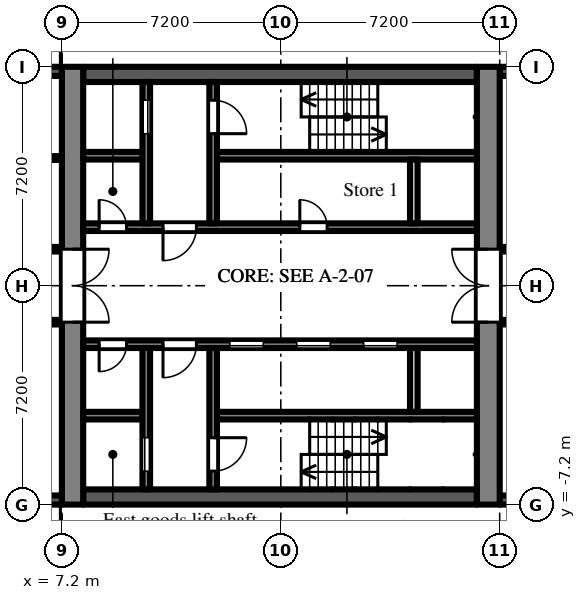
"""IFC4 building model, lengths in metres.
Left out: names, types, materials, properties, quantities, classifications, styles, units other than length and angle.
Written with IfcOpenShell. Run it as: python <this file> out.ifc"""

import sys

from ifc_helpers import new_model, si_unit, direction, frame, frame_2d, origin, place, context, subcontext, project, spatial, rectangle, extrude, element, fill, save


model = new_model("IFC4")
c1 = context("Model", 3, precision=1e-05, world=origin(), true_north=direction((0.0, 1.0)))
c2 = subcontext(c1, "Body", "Model", "MODEL_VIEW")
j1 = project(units=[si_unit("LENGTHUNIT", "METRE"), si_unit("PLANEANGLEUNIT", "RADIAN")], contexts=[c1])
p1 = place(None, origin())
s1 = spatial("IfcSite", under=j1, at=p1, CompositionType="ELEMENT")
p2 = place(p1, origin())
s2 = spatial("IfcBuilding", under=s1, at=p2, CompositionType="ELEMENT")
p3 = place(p2, frame((0.0, 0.0, 35.7)))
s3 = spatial("IfcBuildingStorey", under=s2, at=p3, CompositionType="ELEMENT", Elevation=35.7)
p4 = place(p3, frame((21.6, -7.05, 0.0), z_axis=(0.0, 0.0, 1.0), x_axis=(1.0, 0.0, 0.0)))
e1 = element("IfcWall", 1, at=p4, inside=s3, PredefinedType="SOLIDWALL", context=c2, shape_type="SweptSolid", body=[
    extrude(rectangle(XDim=2.7, YDim=0.3, at=frame_2d((1.35, 0.0))), origin(), (0.0, 0.0, 1.0), 2.1),
])
p5 = place(p4, frame((0.75, 0.0, 0.2)))
e2 = element("IfcOpeningElement", 2, at=p5, cuts=e1, PredefinedType="OPENING", context=c2, shape_type="SweptSolid", body=[
    extrude(rectangle(XDim=1.2, YDim=1.85, at=frame_2d((0.6, 0.925))), frame((0.0, 0.16, 0.0), z_axis=(0.0, -1.0, 0.0), x_axis=(1.0, 0.0, 0.0)), (0.0, 0.0, 1.0), 0.32),
])
p6 = place(p3, frame((24.3, 7.05, 0.0), z_axis=(0.0, 0.0, 1.0), x_axis=(-1.0, 0.0, 0.0)))
e3 = element("IfcWall", 3, at=p6, inside=s3, PredefinedType="SOLIDWALL", context=c2, shape_type="SweptSolid", body=[
    extrude(rectangle(XDim=2.7, YDim=0.3, at=frame_2d((1.35, 0.0))), origin(), (0.0, 0.0, 1.0), 2.1),
])
p7 = place(p6, frame((0.75, 0.0, 0.2)))
e4 = element("IfcOpeningElement", 4, at=p7, cuts=e3, PredefinedType="OPENING", context=c2, shape_type="SweptSolid", body=[
    extrude(rectangle(XDim=1.2, YDim=1.85, at=frame_2d((0.6, 0.925))), frame((0.0, 0.16, 0.0), z_axis=(0.0, -1.0, 0.0), x_axis=(1.0, 0.0, 0.0)), (0.0, 0.0, 1.0), 0.32),
])
for number, where, z_axis, x_axis in (
    (5, (7.2, 7.05, 0.0), (0.0, 0.0, 1.0), (-1.0, 0.0, 0.0)),
    (6, (4.2, -7.05, 0.0), (0.0, 0.0, 1.0), (1.0, 0.0, 0.0)),
):
    element("IfcWall", number, at=place(p3, frame(where, z_axis=z_axis, x_axis=x_axis)), inside=s3, PredefinedType="SOLIDWALL", context=c2, shape_type="SweptSolid", body=[
        extrude(rectangle(XDim=3.0, YDim=0.3, at=frame_2d((1.5, 0.0))), origin(), (0.0, 0.0, 1.0), 2.1),
    ])
p8 = place(p3, frame((7.55, -7.2, 0.0), z_axis=(0.0, 0.0, 1.0), x_axis=(0.0, 1.0, 0.0)))
e7 = element("IfcWall", 7, at=p8, inside=s3, PredefinedType="SHEAR", context=c2, shape_type="SweptSolid", body=[
    extrude(rectangle(XDim=14.4, YDim=0.7, at=frame_2d((7.2, 0.0))), origin(), (0.0, 0.0, 1.0), 2.575),
])
p9 = place(p8, frame((6.0, 0.0, 0.0)))
e8 = element("IfcOpeningElement", 8, at=p9, cuts=e7, PredefinedType="OPENING", context=c2, shape_type="SweptSolid", body=[
    extrude(rectangle(XDim=2.4, YDim=2.2, at=frame_2d((1.2, 1.1))), frame((0.0, 0.36, 0.0), z_axis=(0.0, -1.0, 0.0), x_axis=(1.0, 0.0, 0.0)), (0.0, 0.0, 1.0), 0.72),
])
p10 = place(p3, frame((21.225, -7.2, 0.0), z_axis=(0.0, 0.0, 1.0), x_axis=(0.0, 1.0, 0.0)))
e9 = element("IfcWall", 9, at=p10, inside=s3, PredefinedType="SHEAR", context=c2, shape_type="SweptSolid", body=[
    extrude(rectangle(XDim=14.4, YDim=0.75, at=frame_2d((7.2, 0.0))), origin(), (0.0, 0.0, 1.0), 2.575),
])
p11 = place(p10, frame((6.0, 0.0, 0.0)))
e10 = element("IfcOpeningElement", 10, at=p11, cuts=e9, PredefinedType="OPENING", context=c2, shape_type="SweptSolid", body=[
    extrude(rectangle(XDim=2.4, YDim=2.2, at=frame_2d((1.2, 1.1))), frame((0.0, 0.385, 0.0), z_axis=(0.0, -1.0, 0.0), x_axis=(1.0, 0.0, 0.0)), (0.0, 0.0, 1.0), 0.77),
])
p12 = place(p3, frame((7.9, 6.95, 0.0), z_axis=(0.0, 0.0, 1.0), x_axis=(1.0, 0.0, 0.0)))
e11 = element("IfcWall", 11, at=p12, inside=s3, PredefinedType="SHEAR", context=c2, shape_type="SweptSolid", body=[
    extrude(rectangle(XDim=12.95, YDim=0.5, at=frame_2d((6.475, 0.0))), origin(), (0.0, 0.0, 1.0), 2.575),
])
p13 = place(p3, frame((7.9, 1.925, 0.0), z_axis=(0.0, 0.0, 1.0), x_axis=(1.0, 0.0, 0.0)))
e12 = element("IfcWall", 12, at=p13, inside=s3, PredefinedType="SHEAR", context=c2, shape_type="SweptSolid", body=[
    extrude(rectangle(XDim=12.95, YDim=0.25, at=frame_2d((6.475, 0.0))), origin(), (0.0, 0.0, 1.0), 2.575),
])
p14 = place(p13, frame((0.525, 0.0, 0.0)))
e13 = element("IfcOpeningElement", 13, at=p14, cuts=e12, PredefinedType="OPENING", context=c2, shape_type="SweptSolid", body=[
    extrude(rectangle(XDim=0.9, YDim=2.1, at=frame_2d((0.45, 1.05))), frame((0.0, 0.135, 0.0), z_axis=(0.0, -1.0, 0.0), x_axis=(1.0, 0.0, 0.0)), (0.0, 0.0, 1.0), 0.27),
])
p15 = place(p13, frame((2.625, 0.0, 0.0)))
e14 = element("IfcOpeningElement", 14, at=p15, cuts=e12, PredefinedType="OPENING", context=c2, shape_type="SweptSolid", body=[
    extrude(rectangle(XDim=1.1, YDim=2.1, at=frame_2d((0.55, 1.05))), frame((0.0, 0.135, 0.0), z_axis=(0.0, -1.0, 0.0), x_axis=(1.0, 0.0, 0.0)), (0.0, 0.0, 1.0), 0.27),
])
p16 = place(p13, frame((7.125, 0.0, 0.0)))
e15 = element("IfcOpeningElement", 15, at=p16, cuts=e12, PredefinedType="OPENING", context=c2, shape_type="SweptSolid", body=[
    extrude(rectangle(XDim=0.9, YDim=2.1, at=frame_2d((0.45, 1.05))), frame((0.0, 0.135, 0.0), z_axis=(0.0, -1.0, 0.0), x_axis=(1.0, 0.0, 0.0)), (0.0, 0.0, 1.0), 0.27),
])
p17 = place(p3, frame((7.9, 4.275, 0.0), z_axis=(0.0, 0.0, 1.0), x_axis=(1.0, 0.0, 0.0)))
e16 = element("IfcWall", 16, at=p17, inside=s3, PredefinedType="SHEAR", context=c2, shape_type="SweptSolid", body=[
    extrude(rectangle(XDim=1.95, YDim=0.25, at=frame_2d((0.975, 0.0))), origin(), (0.0, 0.0, 1.0), 2.575),
])
p18 = place(p3, frame((12.3, 4.275, 0.0), z_axis=(0.0, 0.0, 1.0), x_axis=(1.0, 0.0, 0.0)))
e17 = element("IfcWall", 17, at=p18, inside=s3, PredefinedType="SHEAR", context=c2, shape_type="SweptSolid", body=[
    extrude(rectangle(XDim=8.55, YDim=0.25, at=frame_2d((4.275, 0.0))), origin(), (0.0, 0.0, 1.0), 2.575),
])
p19 = place(p3, frame((9.975, 2.05, 0.0), z_axis=(0.0, 0.0, 1.0), x_axis=(0.0, 1.0, 0.0)))
e18 = element("IfcWall", 18, at=p19, inside=s3, PredefinedType="SHEAR", context=c2, shape_type="SweptSolid", body=[
    extrude(rectangle(XDim=4.65, YDim=0.25, at=frame_2d((2.325, 0.0))), origin(), (0.0, 0.0, 1.0), 2.575),
])
p20 = place(p19, frame((2.95, 0.0, 0.0)))
e19 = element("IfcOpeningElement", 19, at=p20, cuts=e18, PredefinedType="OPENING", context=c2, shape_type="SweptSolid", body=[
    extrude(rectangle(XDim=1.1, YDim=2.1, at=frame_2d((0.55, 1.05))), frame((0.0, 0.135, 0.0), z_axis=(0.0, -1.0, 0.0), x_axis=(1.0, 0.0, 0.0)), (0.0, 0.0, 1.0), 0.27),
])
p21 = place(p3, frame((12.175, 2.05, 0.0), z_axis=(0.0, 0.0, 1.0), x_axis=(0.0, 1.0, 0.0)))
e20 = element("IfcWall", 20, at=p21, inside=s3, PredefinedType="SHEAR", context=c2, shape_type="SweptSolid", body=[
    extrude(rectangle(XDim=4.65, YDim=0.25, at=frame_2d((2.325, 0.0))), origin(), (0.0, 0.0, 1.0), 2.575),
])
p22 = place(p21, frame((2.95, 0.0, 0.0)))
e21 = element("IfcOpeningElement", 21, at=p22, cuts=e20, PredefinedType="OPENING", context=c2, shape_type="SweptSolid", body=[
    extrude(rectangle(XDim=1.1, YDim=2.1, at=frame_2d((0.55, 1.05))), frame((0.0, 0.135, 0.0), z_axis=(0.0, -1.0, 0.0), x_axis=(1.0, 0.0, 0.0)), (0.0, 0.0, 1.0), 0.27),
])
p23 = place(p3, frame((18.775, 2.05, 0.0), z_axis=(0.0, 0.0, 1.0), x_axis=(0.0, 1.0, 0.0)))
e22 = element("IfcWall", 22, at=p23, inside=s3, PredefinedType="PARTITIONING", context=c2, shape_type="SweptSolid", body=[
    extrude(rectangle(XDim=2.1, YDim=0.25, at=frame_2d((1.05, 0.0))), origin(), (0.0, 0.0, 1.0), 2.575),
])
p24 = place(p3, frame((7.9, -6.95, 0.0), z_axis=(0.0, 0.0, 1.0), x_axis=(1.0, 0.0, 0.0)))
e23 = element("IfcWall", 23, at=p24, inside=s3, PredefinedType="SHEAR", context=c2, shape_type="SweptSolid", body=[
    extrude(rectangle(XDim=12.95, YDim=0.5, at=frame_2d((6.475, 0.0))), origin(), (0.0, 0.0, 1.0), 2.575),
])
p25 = place(p3, frame((7.9, -1.925, 0.0), z_axis=(0.0, 0.0, 1.0), x_axis=(1.0, 0.0, 0.0)))
e24 = element("IfcWall", 24, at=p25, inside=s3, PredefinedType="SHEAR", context=c2, shape_type="SweptSolid", body=[
    extrude(rectangle(XDim=12.95, YDim=0.25, at=frame_2d((6.475, 0.0))), origin(), (0.0, 0.0, 1.0), 2.575),
])
p26 = place(p25, frame((4.825, 0.0, 0.0)))
e25 = element("IfcOpeningElement", 25, at=p26, cuts=e24, PredefinedType="OPENING", context=c2, shape_type="SweptSolid", body=[
    extrude(rectangle(XDim=1.1, YDim=2.1, at=frame_2d((0.55, 1.05))), frame((0.0, 0.135, 0.0), z_axis=(0.0, -1.0, 0.0), x_axis=(1.0, 0.0, 0.0)), (0.0, 0.0, 1.0), 0.27),
])
p27 = place(p25, frame((7.025, 0.0, 0.0)))
e26 = element("IfcOpeningElement", 26, at=p27, cuts=e24, PredefinedType="OPENING", context=c2, shape_type="SweptSolid", body=[
    extrude(rectangle(XDim=1.1, YDim=2.1, at=frame_2d((0.55, 1.05))), frame((0.0, 0.135, 0.0), z_axis=(0.0, -1.0, 0.0), x_axis=(1.0, 0.0, 0.0)), (0.0, 0.0, 1.0), 0.27),
])
p28 = place(p25, frame((9.225, 0.0, 0.0)))
e27 = element("IfcOpeningElement", 27, at=p28, cuts=e24, PredefinedType="OPENING", context=c2, shape_type="SweptSolid", body=[
    extrude(rectangle(XDim=1.1, YDim=2.1, at=frame_2d((0.55, 1.05))), frame((0.0, 0.135, 0.0), z_axis=(0.0, -1.0, 0.0), x_axis=(1.0, 0.0, 0.0)), (0.0, 0.0, 1.0), 0.27),
])
p29 = place(p25, frame((0.525, 0.0, 0.0)))
e28 = element("IfcOpeningElement", 28, at=p29, cuts=e24, PredefinedType="OPENING", context=c2, shape_type="SweptSolid", body=[
    extrude(rectangle(XDim=0.9, YDim=2.1, at=frame_2d((0.45, 1.05))), frame((0.0, 0.135, 0.0), z_axis=(0.0, -1.0, 0.0), x_axis=(1.0, 0.0, 0.0)), (0.0, 0.0, 1.0), 0.27),
])
p30 = place(p25, frame((2.625, 0.0, 0.0)))
e29 = element("IfcOpeningElement", 29, at=p30, cuts=e24, PredefinedType="OPENING", context=c2, shape_type="SweptSolid", body=[
    extrude(rectangle(XDim=1.1, YDim=2.1, at=frame_2d((0.55, 1.05))), frame((0.0, 0.135, 0.0), z_axis=(0.0, -1.0, 0.0), x_axis=(1.0, 0.0, 0.0)), (0.0, 0.0, 1.0), 0.27),
])
p31 = place(p3, frame((7.9, -4.275, 0.0), z_axis=(0.0, 0.0, 1.0), x_axis=(1.0, 0.0, 0.0)))
e30 = element("IfcWall", 30, at=p31, inside=s3, PredefinedType="SHEAR", context=c2, shape_type="SweptSolid", body=[
    extrude(rectangle(XDim=1.95, YDim=0.25, at=frame_2d((0.975, 0.0))), origin(), (0.0, 0.0, 1.0), 2.575),
])
p32 = place(p3, frame((12.3, -4.275, 0.0), z_axis=(0.0, 0.0, 1.0), x_axis=(1.0, 0.0, 0.0)))
e31 = element("IfcWall", 31, at=p32, inside=s3, PredefinedType="SHEAR", context=c2, shape_type="SweptSolid", body=[
    extrude(rectangle(XDim=8.55, YDim=0.25, at=frame_2d((4.275, 0.0))), origin(), (0.0, 0.0, 1.0), 2.575),
])
p33 = place(p3, frame((9.975, -2.05, 0.0), z_axis=(0.0, 0.0, 1.0), x_axis=(0.0, -1.0, 0.0)))
e32 = element("IfcWall", 32, at=p33, inside=s3, PredefinedType="SHEAR", context=c2, shape_type="SweptSolid", body=[
    extrude(rectangle(XDim=4.65, YDim=0.25, at=frame_2d((2.325, 0.0))), origin(), (0.0, 0.0, 1.0), 2.575),
])
p34 = place(p33, frame((2.95, 0.0, 0.0)))
e33 = element("IfcOpeningElement", 33, at=p34, cuts=e32, PredefinedType="OPENING", context=c2, shape_type="SweptSolid", body=[
    extrude(rectangle(XDim=1.1, YDim=2.1, at=frame_2d((0.55, 1.05))), frame((0.0, 0.135, 0.0), z_axis=(0.0, -1.0, 0.0), x_axis=(1.0, 0.0, 0.0)), (0.0, 0.0, 1.0), 0.27),
])
p35 = place(p3, frame((12.175, -2.05, 0.0), z_axis=(0.0, 0.0, 1.0), x_axis=(0.0, -1.0, 0.0)))
e34 = element("IfcWall", 34, at=p35, inside=s3, PredefinedType="SHEAR", context=c2, shape_type="SweptSolid", body=[
    extrude(rectangle(XDim=4.65, YDim=0.25, at=frame_2d((2.325, 0.0))), origin(), (0.0, 0.0, 1.0), 2.575),
])
p36 = place(p35, frame((2.95, 0.0, 0.0)))
e35 = element("IfcOpeningElement", 35, at=p36, cuts=e34, PredefinedType="OPENING", context=c2, shape_type="SweptSolid", body=[
    extrude(rectangle(XDim=1.1, YDim=2.1, at=frame_2d((0.55, 1.05))), frame((0.0, 0.135, 0.0), z_axis=(0.0, -1.0, 0.0), x_axis=(1.0, 0.0, 0.0)), (0.0, 0.0, 1.0), 0.27),
])
p37 = place(p3, frame((18.775, -2.05, 0.0), z_axis=(0.0, 0.0, 1.0), x_axis=(0.0, -1.0, 0.0)))
e36 = element("IfcWall", 36, at=p37, inside=s3, PredefinedType="PARTITIONING", context=c2, shape_type="SweptSolid", body=[
    extrude(rectangle(XDim=2.1, YDim=0.25, at=frame_2d((1.05, 0.0))), origin(), (0.0, 0.0, 1.0), 2.575),
])
p38 = place(p3, frame((1.275, -1.2, 0.0), z_axis=(0.0, 0.0, 1.0), x_axis=(1.0, 0.0, 0.0)))
e37 = element("IfcWall", 37, at=p38, inside=s3, PredefinedType="PARTITIONING", context=c2, shape_type="SweptSolid", body=[
    extrude(rectangle(XDim=5.925, YDim=0.15, at=frame_2d((2.962, 0.0))), origin(), (0.0, 0.0, 1.0), 2.575),
])
p39 = place(p38, frame((3.475, 0.0, 0.0)))
e38 = element("IfcOpeningElement", 38, at=p39, cuts=e37, PredefinedType="OPENING", context=c2, shape_type="SweptSolid", body=[
    extrude(rectangle(XDim=0.9, YDim=2.1, at=frame_2d((0.45, 1.05))), frame((0.0, 0.085, 0.0), z_axis=(0.0, -1.0, 0.0), x_axis=(1.0, 0.0, 0.0)), (0.0, 0.0, 1.0), 0.17),
])
p40 = place(p3, frame((1.275, 1.2, 0.0), z_axis=(0.0, 0.0, 1.0), x_axis=(1.0, 0.0, 0.0)))
e39 = element("IfcWall", 39, at=p40, inside=s3, PredefinedType="PARTITIONING", context=c2, shape_type="SweptSolid", body=[
    extrude(rectangle(XDim=5.925, YDim=0.15, at=frame_2d((2.962, 0.0))), origin(), (0.0, 0.0, 1.0), 2.575),
])
p41 = place(p40, frame((2.475, 0.0, 0.0)))
e40 = element("IfcOpeningElement", 40, at=p41, cuts=e39, PredefinedType="OPENING", context=c2, shape_type="SweptSolid", body=[
    extrude(rectangle(XDim=0.9, YDim=2.1, at=frame_2d((0.45, 1.05))), frame((0.0, 0.085, 0.0), z_axis=(0.0, -1.0, 0.0), x_axis=(1.0, 0.0, 0.0)), (0.0, 0.0, 1.0), 0.17),
])
p42 = place(p3, frame((1.275, 4.2, 0.0), z_axis=(0.0, 0.0, 1.0), x_axis=(1.0, 0.0, 0.0)))
e41 = element("IfcWall", 41, at=p42, inside=s3, PredefinedType="PARTITIONING", context=c2, shape_type="SweptSolid", body=[
    extrude(rectangle(XDim=5.925, YDim=0.125, at=frame_2d((2.962, 0.0))), origin(), (0.0, 0.0, 1.0), 2.575),
])
p43 = place(p3, frame((21.6, -1.2, 0.0), z_axis=(0.0, 0.0, 1.0), x_axis=(1.0, 0.0, 0.0)))
e42 = element("IfcWall", 42, at=p43, inside=s3, PredefinedType="PARTITIONING", context=c2, shape_type="SweptSolid", body=[
    extrude(rectangle(XDim=14.9, YDim=0.15, at=frame_2d((7.45, 0.0))), origin(), (0.0, 0.0, 1.0), 2.575),
])
p44 = place(p43, frame((3.8, 0.0, 0.0)))
e43 = element("IfcOpeningElement", 43, at=p44, cuts=e42, PredefinedType="OPENING", context=c2, shape_type="SweptSolid", body=[
    extrude(rectangle(XDim=1.0, YDim=2.1, at=frame_2d((0.5, 1.05))), frame((0.0, 0.085, 0.0), z_axis=(0.0, -1.0, 0.0), x_axis=(1.0, 0.0, 0.0)), (0.0, 0.0, 1.0), 0.17),
])
p45 = place(p43, frame((9.2, 0.0, 0.0)))
e44 = element("IfcOpeningElement", 44, at=p45, cuts=e42, PredefinedType="OPENING", context=c2, shape_type="SweptSolid", body=[
    extrude(rectangle(XDim=1.0, YDim=2.1, at=frame_2d((0.5, 1.05))), frame((0.0, 0.085, 0.0), z_axis=(0.0, -1.0, 0.0), x_axis=(1.0, 0.0, 0.0)), (0.0, 0.0, 1.0), 0.17),
])
p46 = place(p43, frame((11.95, 0.0, 0.0)))
e45 = element("IfcOpeningElement", 45, at=p46, cuts=e42, PredefinedType="OPENING", context=c2, shape_type="SweptSolid", body=[
    extrude(rectangle(XDim=1.8, YDim=2.1, at=frame_2d((0.9, 1.05))), frame((0.0, 0.085, 0.0), z_axis=(0.0, -1.0, 0.0), x_axis=(1.0, 0.0, 0.0)), (0.0, 0.0, 1.0), 0.17),
])
p47 = place(p3, frame((21.6, 1.2, 0.0), z_axis=(0.0, 0.0, 1.0), x_axis=(1.0, 0.0, 0.0)))
e46 = element("IfcWall", 46, at=p47, inside=s3, PredefinedType="PARTITIONING", context=c2, shape_type="SweptSolid", body=[
    extrude(rectangle(XDim=14.9, YDim=0.15, at=frame_2d((7.45, 0.0))), origin(), (0.0, 0.0, 1.0), 2.575),
])
p48 = place(p47, frame((0.6, 0.0, 0.0)))
e47 = element("IfcOpeningElement", 47, at=p48, cuts=e46, PredefinedType="OPENING", context=c2, shape_type="SweptSolid", body=[
    extrude(rectangle(XDim=1.0, YDim=2.1, at=frame_2d((0.5, 1.05))), frame((0.0, 0.085, 0.0), z_axis=(0.0, -1.0, 0.0), x_axis=(1.0, 0.0, 0.0)), (0.0, 0.0, 1.0), 0.17),
])
p49 = place(p47, frame((9.49, 0.0, 0.0)))
e48 = element("IfcOpeningElement", 48, at=p49, cuts=e46, PredefinedType="OPENING", context=c2, shape_type="SweptSolid", body=[
    extrude(rectangle(XDim=1.0, YDim=2.1, at=frame_2d((0.5, 1.05))), frame((0.0, 0.085, 0.0), z_axis=(0.0, -1.0, 0.0), x_axis=(1.0, 0.0, 0.0)), (0.0, 0.0, 1.0), 0.17),
])
p50 = place(p47, frame((11.95, 0.0, 0.0)))
e49 = element("IfcOpeningElement", 49, at=p50, cuts=e46, PredefinedType="OPENING", context=c2, shape_type="SweptSolid", body=[
    extrude(rectangle(XDim=1.8, YDim=2.1, at=frame_2d((0.9, 1.05))), frame((0.0, 0.085, 0.0), z_axis=(0.0, -1.0, 0.0), x_axis=(1.0, 0.0, 0.0)), (0.0, 0.0, 1.0), 0.17),
])
p51 = place(p26, origin())
e50 = element("IfcDoor", 50, at=p51, inside=s3, OperationType="SLIDING_TO_LEFT", PredefinedType="DOOR", context=c2, shape_type="SweptSolid", body=[
    extrude(rectangle(XDim=1.1, YDim=2.1, at=frame_2d((0.55, 1.05))), frame((0.0, 0.025, 0.0), z_axis=(0.0, -1.0, 0.0), x_axis=(1.0, 0.0, 0.0)), (0.0, 0.0, 1.0), 0.05),
])
fill(e25, e50)
p52 = place(p27, origin())
e51 = element("IfcDoor", 51, at=p52, inside=s3, OperationType="SLIDING_TO_LEFT", PredefinedType="DOOR", context=c2, shape_type="SweptSolid", body=[
    extrude(rectangle(XDim=1.1, YDim=2.1, at=frame_2d((0.55, 1.05))), frame((0.0, 0.025, 0.0), z_axis=(0.0, -1.0, 0.0), x_axis=(1.0, 0.0, 0.0)), (0.0, 0.0, 1.0), 0.05),
])
fill(e26, e51)
p53 = place(p28, origin())
e52 = element("IfcDoor", 52, at=p53, inside=s3, OperationType="SLIDING_TO_LEFT", PredefinedType="DOOR", context=c2, shape_type="SweptSolid", body=[
    extrude(rectangle(XDim=1.1, YDim=2.1, at=frame_2d((0.55, 1.05))), frame((0.0, 0.025, 0.0), z_axis=(0.0, -1.0, 0.0), x_axis=(1.0, 0.0, 0.0)), (0.0, 0.0, 1.0), 0.05),
])
fill(e27, e52)
p54 = place(p20, origin())
e53 = element("IfcDoor", 53, at=p54, inside=s3, OperationType="SLIDING_TO_LEFT", PredefinedType="DOOR", context=c2, shape_type="SweptSolid", body=[
    extrude(rectangle(XDim=1.1, YDim=2.1, at=frame_2d((0.55, 1.05))), frame((0.0, 0.025, 0.0), z_axis=(0.0, -1.0, 0.0), x_axis=(1.0, 0.0, 0.0)), (0.0, 0.0, 1.0), 0.05),
])
fill(e19, e53)
p55 = place(p34, origin())
e54 = element("IfcDoor", 54, at=p55, inside=s3, OperationType="SLIDING_TO_LEFT", PredefinedType="DOOR", context=c2, shape_type="SweptSolid", body=[
    extrude(rectangle(XDim=1.1, YDim=2.1, at=frame_2d((0.55, 1.05))), frame((0.0, 0.025, 0.0), z_axis=(0.0, -1.0, 0.0), x_axis=(1.0, 0.0, 0.0)), (0.0, 0.0, 1.0), 0.05),
])
fill(e33, e54)
p56 = place(p22, frame((1.1, 0.0, 0.0), z_axis=(0.0, 0.0, 1.0), x_axis=(-1.0, 0.0, 0.0)))
e55 = element("IfcDoor", 55, at=p56, inside=s3, OperationType="SINGLE_SWING_RIGHT", PredefinedType="DOOR", context=c2, shape_type="SweptSolid", body=[
    extrude(rectangle(XDim=1.1, YDim=2.1, at=frame_2d((0.55, 1.05))), frame((0.0, 0.025, 0.0), z_axis=(0.0, -1.0, 0.0), x_axis=(1.0, 0.0, 0.0)), (0.0, 0.0, 1.0), 0.05),
])
fill(e21, e55)
p57 = place(p36, origin())
e56 = element("IfcDoor", 56, at=p57, inside=s3, OperationType="SINGLE_SWING_LEFT", PredefinedType="DOOR", context=c2, shape_type="SweptSolid", body=[
    extrude(rectangle(XDim=1.1, YDim=2.1, at=frame_2d((0.55, 1.05))), frame((0.0, 0.025, 0.0), z_axis=(0.0, -1.0, 0.0), x_axis=(1.0, 0.0, 0.0)), (0.0, 0.0, 1.0), 0.05),
])
fill(e35, e56)
p58 = place(p14, origin())
e57 = element("IfcDoor", 57, at=p58, inside=s3, OperationType="SINGLE_SWING_LEFT", PredefinedType="DOOR", context=c2, shape_type="SweptSolid", body=[
    extrude(rectangle(XDim=0.9, YDim=2.1, at=frame_2d((0.45, 1.05))), frame((0.0, 0.025, 0.0), z_axis=(0.0, -1.0, 0.0), x_axis=(1.0, 0.0, 0.0)), (0.0, 0.0, 1.0), 0.05),
])
fill(e13, e57)
p59 = place(p29, frame((0.9, 0.0, 0.0), z_axis=(0.0, 0.0, 1.0), x_axis=(-1.0, 0.0, 0.0)))
e58 = element("IfcDoor", 58, at=p59, inside=s3, OperationType="SINGLE_SWING_RIGHT", PredefinedType="DOOR", context=c2, shape_type="SweptSolid", body=[
    extrude(rectangle(XDim=0.9, YDim=2.1, at=frame_2d((0.45, 1.05))), frame((0.0, 0.025, 0.0), z_axis=(0.0, -1.0, 0.0), x_axis=(1.0, 0.0, 0.0)), (0.0, 0.0, 1.0), 0.05),
])
fill(e28, e58)
p60 = place(p15, frame((1.1, 0.0, 0.0), z_axis=(0.0, 0.0, 1.0), x_axis=(-1.0, 0.0, 0.0)))
e59 = element("IfcDoor", 59, at=p60, inside=s3, OperationType="SINGLE_SWING_RIGHT", PredefinedType="DOOR", context=c2, shape_type="SweptSolid", body=[
    extrude(rectangle(XDim=1.1, YDim=2.1, at=frame_2d((0.55, 1.05))), frame((0.0, 0.025, 0.0), z_axis=(0.0, -1.0, 0.0), x_axis=(1.0, 0.0, 0.0)), (0.0, 0.0, 1.0), 0.05),
])
fill(e14, e59)
p61 = place(p30, frame((1.1, 0.0, 0.0), z_axis=(0.0, 0.0, 1.0), x_axis=(-1.0, 0.0, 0.0)))
e60 = element("IfcDoor", 60, at=p61, inside=s3, OperationType="SINGLE_SWING_RIGHT", PredefinedType="DOOR", context=c2, shape_type="SweptSolid", body=[
    extrude(rectangle(XDim=1.1, YDim=2.1, at=frame_2d((0.55, 1.05))), frame((0.0, 0.025, 0.0), z_axis=(0.0, -1.0, 0.0), x_axis=(1.0, 0.0, 0.0)), (0.0, 0.0, 1.0), 0.05),
])
fill(e29, e60)
p62 = place(p9, frame((2.4, 0.0, 0.0), z_axis=(0.0, 0.0, 1.0), x_axis=(-1.0, 0.0, 0.0)))
e61 = element("IfcDoor", 61, at=p62, inside=s3, OperationType="DOUBLE_DOOR_DOUBLE_SWING", PredefinedType="DOOR", context=c2, shape_type="SweptSolid", body=[
    extrude(rectangle(XDim=2.4, YDim=2.2, at=frame_2d((1.2, 1.1))), frame((0.0, 0.025, 0.0), z_axis=(0.0, -1.0, 0.0), x_axis=(1.0, 0.0, 0.0)), (0.0, 0.0, 1.0), 0.05),
])
fill(e8, e61)
p63 = place(p11, origin())
e62 = element("IfcDoor", 62, at=p63, inside=s3, OperationType="DOUBLE_DOOR_DOUBLE_SWING", PredefinedType="DOOR", context=c2, shape_type="SweptSolid", body=[
    extrude(rectangle(XDim=2.4, YDim=2.2, at=frame_2d((1.2, 1.1))), frame((0.0, 0.025, 0.0), z_axis=(0.0, -1.0, 0.0), x_axis=(1.0, 0.0, 0.0)), (0.0, 0.0, 1.0), 0.05),
])
fill(e10, e62)
p64 = place(p16, origin())
e63 = element("IfcDoor", 63, at=p64, inside=s3, OperationType="SINGLE_SWING_LEFT", PredefinedType="DOOR", context=c2, shape_type="SweptSolid", body=[
    extrude(rectangle(XDim=0.9, YDim=2.1, at=frame_2d((0.45, 1.05))), frame((0.0, 0.025, 0.0), z_axis=(0.0, -1.0, 0.0), x_axis=(1.0, 0.0, 0.0)), (0.0, 0.0, 1.0), 0.05),
])
fill(e15, e63)
save(model, sys.argv[1])
